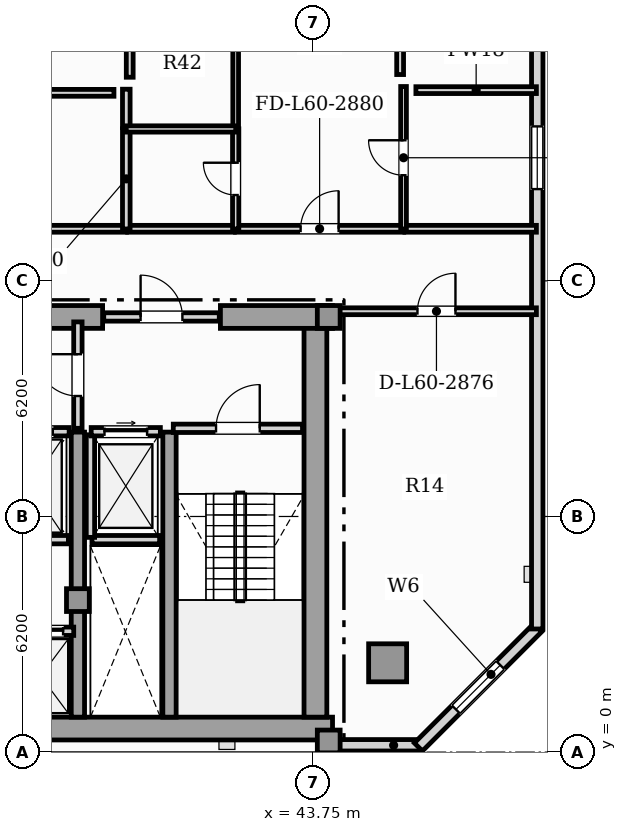
"""IFC4 building model, lengths in metres.
Left out: names, types, materials, properties, quantities, classifications, styles, units other than length and angle.
Written with IfcOpenShell. Run it as: python <this file> out.ifc"""

import sys

from ifc_helpers import new_model, si_unit, direction, frame, frame_2d, origin, origin_2d, place, context, subcontext, project, spatial, rectangle, hollow_rectangle, extrude, element, fill, save


model = new_model("IFC4")
c1 = context("Model", 3, precision=1e-05, world=origin(), true_north=direction((0.0, 1.0)))
c2 = subcontext(c1, "Body", "Model", "MODEL_VIEW")
j1 = project(units=[si_unit("LENGTHUNIT", "METRE"), si_unit("PLANEANGLEUNIT", "RADIAN")], contexts=[c1])
p1 = place(None, origin())
s1 = spatial("IfcSite", under=j1, at=p1, CompositionType="ELEMENT")
p2 = place(p1, origin())
s2 = spatial("IfcBuilding", under=s1, at=p2, CompositionType="ELEMENT")
p3 = place(p2, frame((0.0, 0.0, 242.65)))
s3 = spatial("IfcBuildingStorey", under=s2, at=p3, CompositionType="ELEMENT", Elevation=242.65)
p4 = place(p3, frame((13.25, 0.62, 0.0), z_axis=(0.0, 0.0, 1.0), x_axis=(1.0, 0.0, 0.0)))
e1 = element("IfcWall", 1, at=p4, inside=s3, PredefinedType="SHEAR", context=c2, shape_type="SweptSolid", body=[
    extrude(rectangle(XDim=31.0, YDim=0.6, at=frame_2d((15.5, 0.0))), origin(), (0.0, 0.0, 1.0), 3.5),
])
p5 = place(p3, frame((43.8, 0.92, 0.0), z_axis=(0.0, 0.0, 1.0), x_axis=(0.0, 1.0, 0.0)))
e2 = element("IfcWall", 2, at=p5, inside=s3, PredefinedType="SHEAR", context=c2, shape_type="SweptSolid", body=[
    extrude(rectangle(XDim=10.53, YDim=0.6, at=frame_2d((5.265, 0.0))), origin(), (0.0, 0.0, 1.0), 3.5),
])
p6 = place(p3, frame((30.9, 11.45, 0.0), z_axis=(0.0, 0.0, 1.0), x_axis=(1.0, 0.0, 0.0)))
e3 = element("IfcWall", 3, at=p6, inside=s3, PredefinedType="SHEAR", context=c2, shape_type="SweptSolid", body=[
    extrude(rectangle(XDim=7.3, YDim=0.6, at=frame_2d((3.65, 0.0))), origin(), (0.0, 0.0, 1.0), 3.5),
])
p7 = place(p3, frame((41.3, 11.45, 0.0), z_axis=(0.0, 0.0, 1.0), x_axis=(1.0, 0.0, 0.0)))
e4 = element("IfcWall", 4, at=p7, inside=s3, PredefinedType="SHEAR", context=c2, shape_type="SweptSolid", body=[
    extrude(rectangle(XDim=2.95, YDim=0.6, at=frame_2d((1.475, 0.0))), origin(), (0.0, 0.0, 1.0), 3.5),
])
for number, where, z_axis, x_axis in (
    (5, (37.55, 0.92, 0.0), (0.0, 0.0, 1.0), (0.0, 1.0, 0.0)),
    (6, (39.96, 0.92, 0.0), (0.0, 0.0, 1.0), (0.0, 1.0, 0.0)),
):
    element("IfcWall", number, at=place(p3, frame(where, z_axis=z_axis, x_axis=x_axis)), inside=s3, PredefinedType="SHEAR", context=c2, shape_type="SweptSolid", body=[
        extrude(rectangle(XDim=7.5, YDim=0.35, at=frame_2d((3.75, 0.0))), origin(), (0.0, 0.0, 1.0), 3.5),
    ])
for number, where, z_axis, x_axis in (
    (7, (44.15, 0.28, 0.0), (0.0, 0.0, 1.0), (1.0, 0.0, 0.0)),
    (8, (44.15, 11.45, 0.0), (0.0, 0.0, 1.0), (1.0, 0.0, 0.0)),
    (9, (37.55, 4.0, 0.0), (0.0, 0.0, 1.0), (1.0, 0.0, 0.0)),
):
    element("IfcColumn", number, at=place(p3, frame(where, z_axis=z_axis, x_axis=x_axis)), inside=s3, PredefinedType="COLUMN", context=c2, shape_type="SweptSolid", body=[
        extrude(rectangle(XDim=0.6, YDim=0.6, at=origin_2d()), origin(), (0.0, 0.0, 1.0), 3.85),
    ])
p8 = place(p3, frame((45.7, 2.35, 0.0), z_axis=(0.0, 0.0, 1.0), x_axis=(1.0, 0.0, 0.0)))
e10 = element("IfcColumn", 10, at=p8, inside=s3, PredefinedType="USERDEFINED", context=c2, shape_type="SweptSolid", body=[
    extrude(hollow_rectangle(XDim=1.0, YDim=1.0, WallThickness=0.06, at=origin_2d()), origin(), (0.0, 0.0, 1.0), 3.85),
])
p9 = place(p3, frame((44.25, 0.18, 0.0), z_axis=(0.0, 0.0, 1.0), x_axis=(1.0, 0.0, 0.0)))
e11 = element("IfcWall", 11, at=p9, inside=s3, PredefinedType="SOLIDWALL", context=c2, shape_type="SweptSolid", body=[
    extrude(rectangle(XDim=2.297, YDim=0.3, at=frame_2d((1.148, 0.0))), origin(), (0.0, 0.0, 1.0), 3.5),
])
p10 = place(p3, frame((46.509, 0.135, 0.0), z_axis=(0.0, 0.0, 1.0), x_axis=(0.707134240044, 0.707079321262, 0.0)))
e12 = element("IfcWall", 12, at=p10, inside=s3, PredefinedType="SOLIDWALL", context=c2, shape_type="SweptSolid", body=[
    extrude(rectangle(XDim=4.446, YDim=0.3, at=frame_2d((2.223, 0.0))), origin(), (0.0, 0.0, 1.0), 3.5),
])
p11 = place(p10, frame((1.398, 0.0, 0.88)))
e13 = element("IfcOpeningElement", 13, at=p11, cuts=e12, PredefinedType="OPENING", context=c2, shape_type="SweptSolid", body=[
    extrude(rectangle(XDim=1.65, YDim=2.0, at=frame_2d((0.825, 1.0))), frame((0.0, 0.16, 0.0), z_axis=(0.0, -1.0, 0.0), x_axis=(1.0, 0.0, 0.0)), (0.0, 0.0, 1.0), 0.32),
])
p12 = place(p3, frame((49.637, 3.24, 0.0), z_axis=(0.0, 0.0, 1.0), x_axis=(0.0, 1.0, 0.0)))
e14 = element("IfcWall", 14, at=p12, inside=s3, PredefinedType="SOLIDWALL", context=c2, shape_type="SweptSolid", body=[
    extrude(rectangle(XDim=30.103, YDim=0.3, at=frame_2d((15.052, 0.0))), origin(), (0.0, 0.0, 1.0), 3.5),
])
p13 = place(p12, frame((24.06, 0.0, 0.95)))
e15 = element("IfcOpeningElement", 15, at=p13, cuts=e14, PredefinedType="OPENING", context=c2, shape_type="SweptSolid", body=[
    extrude(rectangle(XDim=0.9, YDim=1.5, at=frame_2d((0.45, 0.75))), frame((0.0, 0.16, 0.0), z_axis=(0.0, -1.0, 0.0), x_axis=(1.0, 0.0, 0.0)), (0.0, 0.0, 1.0), 0.32),
])
p14 = place(p12, frame((11.574, 0.0, 0.88)))
e16 = element("IfcOpeningElement", 16, at=p14, cuts=e14, PredefinedType="OPENING", context=c2, shape_type="SweptSolid", body=[
    extrude(rectangle(XDim=1.65, YDim=2.0, at=frame_2d((0.825, 1.0))), frame((0.0, 0.16, 0.0), z_axis=(0.0, -1.0, 0.0), x_axis=(1.0, 0.0, 0.0)), (0.0, 0.0, 1.0), 0.32),
])
p15 = place(p12, frame((26.182, 0.0, 0.88)))
e17 = element("IfcOpeningElement", 17, at=p15, cuts=e14, PredefinedType="OPENING", context=c2, shape_type="SweptSolid", body=[
    extrude(rectangle(XDim=1.65, YDim=2.0, at=frame_2d((0.825, 1.0))), frame((0.0, 0.16, 0.0), z_axis=(0.0, -1.0, 0.0), x_axis=(1.0, 0.0, 0.0)), (0.0, 0.0, 1.0), 0.32),
])
p16 = place(p3, frame((37.92, 5.59, 0.0), z_axis=(0.0, 0.0, 1.0), x_axis=(1.0, 0.0, 0.0)))
e18 = element("IfcWall", 18, at=p16, inside=s3, PredefinedType="SOLIDWALL", context=c2, shape_type="SweptSolid", body=[
    extrude(rectangle(XDim=1.78, YDim=0.22, at=frame_2d((0.89, 0.0))), origin(), (0.0, 0.0, 1.0), 3.5),
])
p17 = place(p3, frame((37.88, 5.65, 0.0), z_axis=(0.0, 0.0, 1.0), x_axis=(0.0, 1.0, 0.0)))
e19 = element("IfcWall", 19, at=p17, inside=s3, PredefinedType="SOLIDWALL", context=c2, shape_type="SweptSolid", body=[
    extrude(rectangle(XDim=2.7, YDim=0.22, at=frame_2d((1.35, 0.0))), origin(), (0.0, 0.0, 1.0), 3.5),
])
p18 = place(p3, frame((37.9, 8.43, 0.0), z_axis=(0.0, 0.0, 1.0), x_axis=(1.0, 0.0, 0.0)))
e20 = element("IfcWall", 20, at=p18, inside=s3, PredefinedType="SOLIDWALL", context=c2, shape_type="SweptSolid", body=[
    extrude(rectangle(XDim=1.82, YDim=0.22, at=frame_2d((0.91, 0.0))), origin(), (0.0, 0.0, 1.0), 3.5),
])
p19 = place(p18, frame((0.35, 0.0, 0.0)))
e21 = element("IfcOpeningElement", 21, at=p19, cuts=e20, PredefinedType="OPENING", context=c2, shape_type="SweptSolid", body=[
    extrude(rectangle(XDim=1.12, YDim=2.25, at=frame_2d((0.56, 1.125))), frame((0.0, 0.12, 0.0), z_axis=(0.0, -1.0, 0.0), x_axis=(1.0, 0.0, 0.0)), (0.0, 0.0, 1.0), 0.24),
])
p20 = place(p3, frame((35.3, 5.59, 0.0), z_axis=(0.0, 0.0, 1.0), x_axis=(1.0, 0.0, 0.0)))
e22 = element("IfcWall", 22, at=p20, inside=s3, PredefinedType="SOLIDWALL", context=c2, shape_type="SweptSolid", body=[
    extrude(rectangle(XDim=2.0, YDim=0.22, at=frame_2d((1.0, 0.0))), origin(), (0.0, 0.0, 1.0), 3.5),
])
p21 = place(p3, frame((35.28, 8.43, 0.0), z_axis=(0.0, 0.0, 1.0), x_axis=(1.0, 0.0, 0.0)))
e23 = element("IfcWall", 23, at=p21, inside=s3, PredefinedType="SOLIDWALL", context=c2, shape_type="SweptSolid", body=[
    extrude(rectangle(XDim=2.04, YDim=0.22, at=frame_2d((1.02, 0.0))), origin(), (0.0, 0.0, 1.0), 3.5),
])
p22 = place(p21, frame((0.43, 0.0, 0.0)))
e24 = element("IfcOpeningElement", 24, at=p22, cuts=e23, PredefinedType="OPENING", context=c2, shape_type="SweptSolid", body=[
    extrude(rectangle(XDim=1.18, YDim=2.2, at=frame_2d((0.59, 1.1))), frame((0.0, 0.12, 0.0), z_axis=(0.0, -1.0, 0.0), x_axis=(1.0, 0.0, 0.0)), (0.0, 0.0, 1.0), 0.24),
])
p23 = place(p3, frame((35.7, 3.18, 0.0), z_axis=(0.0, 0.0, 1.0), x_axis=(1.0, 0.0, 0.0)))
e25 = element("IfcWall", 25, at=p23, inside=s3, PredefinedType="SOLIDWALL", context=c2, shape_type="SweptSolid", body=[
    extrude(rectangle(XDim=1.74, YDim=0.22, at=frame_2d((0.87, 0.0))), origin(), (0.0, 0.0, 1.0), 3.5),
])
p24 = place(p23, frame((0.28, 0.0, 0.0)))
e26 = element("IfcOpeningElement", 26, at=p24, cuts=e25, PredefinedType="OPENING", context=c2, shape_type="SweptSolid", body=[
    extrude(rectangle(XDim=1.18, YDim=2.2, at=frame_2d((0.59, 1.1))), frame((0.0, 0.12, 0.0), z_axis=(0.0, -1.0, 0.0), x_axis=(1.0, 0.0, 0.0)), (0.0, 0.0, 1.0), 0.24),
])
p25 = place(p3, frame((40.06, 8.52, 0.0), z_axis=(0.0, 0.0, 1.0), x_axis=(1.0, 0.0, 0.0)))
e27 = element("IfcWall", 27, at=p25, inside=s3, PredefinedType="SOLIDWALL", context=c2, shape_type="SweptSolid", body=[
    extrude(rectangle(XDim=3.4, YDim=0.22, at=frame_2d((1.7, 0.0))), origin(), (0.0, 0.0, 1.0), 3.5),
])
p26 = place(p25, frame((1.125, 0.0, 0.0)))
e28 = element("IfcOpeningElement", 28, at=p26, cuts=e27, PredefinedType="OPENING", context=c2, shape_type="SweptSolid", body=[
    extrude(rectangle(XDim=1.15, YDim=2.2, at=frame_2d((0.575, 1.1))), frame((0.0, 0.12, 0.0), z_axis=(0.0, -1.0, 0.0), x_axis=(1.0, 0.0, 0.0)), (0.0, 0.0, 1.0), 0.24),
])
p27 = place(p3, frame((37.55, 8.52, 0.0), z_axis=(0.0, 0.0, 1.0), x_axis=(0.0, 1.0, 0.0)))
e29 = element("IfcWall", 29, at=p27, inside=s3, PredefinedType="SOLIDWALL", context=c2, shape_type="SweptSolid", body=[
    extrude(rectangle(XDim=2.8, YDim=0.22, at=frame_2d((1.4, 0.0))), origin(), (0.0, 0.0, 1.0), 2.956),
])
p28 = place(p27, frame((0.85, 0.0, 0.0)))
e30 = element("IfcOpeningElement", 30, at=p28, cuts=e29, PredefinedType="OPENING", context=c2, shape_type="SweptSolid", body=[
    extrude(rectangle(XDim=1.1, YDim=2.2, at=frame_2d((0.55, 1.1))), frame((0.0, 0.12, 0.0), z_axis=(0.0, -1.0, 0.0), x_axis=(1.0, 0.0, 0.0)), (0.0, 0.0, 1.0), 0.24),
])
p29 = place(p3, frame((38.23, 11.45, 0.0), z_axis=(0.0, 0.0, 1.0), x_axis=(1.0, 0.0, 0.0)))
e31 = element("IfcWall", 31, at=p29, inside=s3, PredefinedType="SOLIDWALL", context=c2, shape_type="SweptSolid", body=[
    extrude(rectangle(XDim=3.04, YDim=0.22, at=frame_2d((1.52, 0.0))), origin(), (0.0, 0.0, 1.0), 3.5),
])
p30 = place(p29, frame((0.97, 0.0, 0.0)))
e32 = element("IfcOpeningElement", 32, at=p30, cuts=e31, PredefinedType="OPENING", context=c2, shape_type="SweptSolid", body=[
    extrude(rectangle(XDim=1.1, YDim=2.2, at=frame_2d((0.55, 1.1))), frame((0.0, 0.12, 0.0), z_axis=(0.0, -1.0, 0.0), x_axis=(1.0, 0.0, 0.0)), (0.0, 0.0, 1.0), 0.24),
])
p31 = place(p3, frame((44.355, 11.6, 0.0), z_axis=(0.0, 0.0, 1.0), x_axis=(1.0, 0.0, 0.0)))
e33 = element("IfcWall", 33, at=p31, inside=s3, PredefinedType="PARTITIONING", context=c2, shape_type="SweptSolid", body=[
    extrude(rectangle(XDim=5.259, YDim=0.18, at=frame_2d((2.63, 0.0))), origin(), (0.0, 0.0, 1.0), 3.5),
])
p32 = place(p31, frame((2.13, 0.0, 0.0)))
e34 = element("IfcOpeningElement", 34, at=p32, cuts=e33, PredefinedType="OPENING", context=c2, shape_type="SweptSolid", body=[
    extrude(rectangle(XDim=1.0, YDim=2.15, at=frame_2d((0.5, 1.075))), frame((0.0, 0.1, 0.0), z_axis=(0.0, -1.0, 0.0), x_axis=(1.0, 0.0, 0.0)), (0.0, 0.0, 1.0), 0.2),
])
p33 = place(p3, frame((35.926, 13.77, 0.0), z_axis=(0.0, 0.0, 1.0), x_axis=(1.0, 0.0, 0.0)))
e35 = element("IfcWall", 35, at=p33, inside=s3, PredefinedType="PARTITIONING", context=c2, shape_type="SweptSolid", body=[
    extrude(rectangle(XDim=2.903, YDim=0.18, at=frame_2d((1.451, 0.0))), origin(), (0.0, 0.0, 1.0), 3.5),
])
p34 = place(p3, frame((41.697, 13.77, 0.0), z_axis=(0.0, 0.0, 1.0), x_axis=(1.0, 0.0, 0.0)))
e36 = element("IfcWall", 36, at=p34, inside=s3, PredefinedType="PARTITIONING", context=c2, shape_type="SweptSolid", body=[
    extrude(rectangle(XDim=4.427, YDim=0.18, at=frame_2d((2.213, 0.0))), origin(), (0.0, 0.0, 1.0), 3.5),
])
p35 = place(p34, frame((1.713, 0.0, 0.0)))
e37 = element("IfcOpeningElement", 37, at=p35, cuts=e36, PredefinedType="OPENING", context=c2, shape_type="SweptSolid", body=[
    extrude(rectangle(XDim=1.0, YDim=2.15, at=frame_2d((0.5, 1.075))), frame((0.0, 0.1, 0.0), z_axis=(0.0, -1.0, 0.0), x_axis=(1.0, 0.0, 0.0)), (0.0, 0.0, 1.0), 0.2),
])
p36 = place(p3, frame((38.859, 13.77, 0.0), z_axis=(0.0, 0.0, 1.0), x_axis=(1.0, 0.0, 0.0)))
e38 = element("IfcWall", 38, at=p36, inside=s3, PredefinedType="PARTITIONING", context=c2, shape_type="SweptSolid", body=[
    extrude(rectangle(XDim=2.808, YDim=0.18, at=frame_2d((1.404, 0.0))), origin(), (0.0, 0.0, 1.0), 3.5),
])
p37 = place(p3, frame((46.154, 13.77, 0.0), z_axis=(0.0, 0.0, 1.0), x_axis=(1.0, 0.0, 0.0)))
e39 = element("IfcWall", 39, at=p37, inside=s3, PredefinedType="PARTITIONING", context=c2, shape_type="SweptSolid", body=[
    extrude(rectangle(XDim=3.461, YDim=0.18, at=frame_2d((1.73, 0.0))), origin(), (0.0, 0.0, 1.0), 3.5),
])
p38 = place(p3, frame((38.823, 13.765, 0.0), z_axis=(0.0, 0.0, 1.0), x_axis=(0.0, 1.0, 0.0)))
e40 = element("IfcWall", 40, at=p38, inside=s3, PredefinedType="PARTITIONING", context=c2, shape_type="SweptSolid", body=[
    extrude(rectangle(XDim=2.636, YDim=0.2, at=frame_2d((1.318, 0.0))), origin(), (0.0, 0.0, 1.0), 3.5),
])
p39 = place(p3, frame((38.823, 16.431, 0.0), z_axis=(0.0, 0.0, 1.0), x_axis=(0.0, 1.0, 0.0)))
e41 = element("IfcWall", 41, at=p39, inside=s3, PredefinedType="PARTITIONING", context=c2, shape_type="SweptSolid", body=[
    extrude(rectangle(XDim=1.011, YDim=0.2, at=frame_2d((0.505, 0.0))), origin(), (0.0, 0.0, 1.0), 3.5),
])
p40 = place(p3, frame((41.702, 13.765, 0.0), z_axis=(0.0, 0.0, 1.0), x_axis=(0.0, 1.0, 0.0)))
e42 = element("IfcWall", 42, at=p40, inside=s3, PredefinedType="PLUMBINGWALL", context=c2, shape_type="SweptSolid", body=[
    extrude(rectangle(XDim=2.636, YDim=0.165, at=frame_2d((1.318, 0.0))), origin(), (0.0, 0.0, 1.0), 3.5),
])
p41 = place(p40, frame((0.893, 0.0, 0.0)))
e43 = element("IfcOpeningElement", 43, at=p41, cuts=e42, PredefinedType="OPENING", context=c2, shape_type="SweptSolid", body=[
    extrude(rectangle(XDim=0.85, YDim=2.1, at=frame_2d((0.425, 1.05))), frame((0.0, 0.093, 0.0), z_axis=(0.0, -1.0, 0.0), x_axis=(1.0, 0.0, 0.0)), (0.0, 0.0, 1.0), 0.185),
])
p42 = place(p3, frame((41.702, 16.431, 0.0), z_axis=(0.0, 0.0, 1.0), x_axis=(0.0, 1.0, 0.0)))
e44 = element("IfcWall", 44, at=p42, inside=s3, PredefinedType="PARTITIONING", context=c2, shape_type="SweptSolid", body=[
    extrude(rectangle(XDim=10.574, YDim=0.15, at=frame_2d((5.287, 0.0))), origin(), (0.0, 0.0, 1.0), 3.5),
])
p43 = place(p42, frame((4.827, 0.0, 0.0)))
e45 = element("IfcOpeningElement", 45, at=p43, cuts=e44, PredefinedType="OPENING", context=c2, shape_type="SweptSolid", body=[
    extrude(rectangle(XDim=0.92, YDim=2.1, at=frame_2d((0.46, 1.05))), frame((0.0, 0.085, 0.0), z_axis=(0.0, -1.0, 0.0), x_axis=(1.0, 0.0, 0.0)), (0.0, 0.0, 1.0), 0.17),
])
p44 = place(p3, frame((46.119, 13.765, 0.0), z_axis=(0.0, 0.0, 1.0), x_axis=(0.0, 1.0, 0.0)))
e46 = element("IfcWall", 46, at=p44, inside=s3, PredefinedType="PARTITIONING", context=c2, shape_type="SweptSolid", body=[
    extrude(rectangle(XDim=3.748, YDim=0.15, at=frame_2d((1.874, 0.0))), origin(), (0.0, 0.0, 1.0), 3.5),
])
p45 = place(p44, frame((1.414, 0.0, 0.0)))
e47 = element("IfcOpeningElement", 47, at=p45, cuts=e46, PredefinedType="OPENING", context=c2, shape_type="SweptSolid", body=[
    extrude(rectangle(XDim=0.92, YDim=2.1, at=frame_2d((0.46, 1.05))), frame((0.0, 0.085, 0.0), z_axis=(0.0, -1.0, 0.0), x_axis=(1.0, 0.0, 0.0)), (0.0, 0.0, 1.0), 0.17),
])
p46 = place(p3, frame((38.819, 16.396, 0.0), z_axis=(0.0, 0.0, 1.0), x_axis=(1.0, 0.0, 0.0)))
e48 = element("IfcWall", 48, at=p46, inside=s3, PredefinedType="PLUMBINGWALL", context=c2, shape_type="SweptSolid", body=[
    extrude(rectangle(XDim=2.888, YDim=0.165, at=frame_2d((1.444, 0.0))), origin(), (0.0, 0.0, 1.0), 3.5),
])
p47 = place(p3, frame((36.216, 17.347, 0.0), z_axis=(0.0, 0.0, 1.0), x_axis=(1.0, 0.0, 0.0)))
e49 = element("IfcWall", 49, at=p47, inside=s3, PredefinedType="PARTITIONING", context=c2, shape_type="SweptSolid", body=[
    extrude(rectangle(XDim=2.283, YDim=0.18, at=frame_2d((1.141, 0.0))), origin(), (0.0, 0.0, 1.0), 3.5),
])
p48 = place(p3, frame((46.029, 27.185, 0.0), z_axis=(0.0, 0.0, 1.0), x_axis=(0.0, -1.0, 0.0)))
e50 = element("IfcWall", 50, at=p48, inside=s3, PredefinedType="PARTITIONING", context=c2, shape_type="SweptSolid", body=[
    extrude(rectangle(XDim=9.357, YDim=0.18, at=frame_2d((4.679, 0.0))), origin(), (0.0, 0.0, 1.0), 3.5),
])
p49 = place(p3, frame((38.914, 17.757, 0.0), z_axis=(0.0, 0.0, 1.0), x_axis=(0.0, 1.0, 0.0)))
e51 = element("IfcWall", 51, at=p49, inside=s3, PredefinedType="PARTITIONING", context=c2, shape_type="SweptSolid", body=[
    extrude(rectangle(XDim=8.918, YDim=0.18, at=frame_2d((4.459, 0.0))), origin(), (0.0, 0.0, 1.0), 3.5),
])
p50 = place(p3, frame((46.444, 17.418, 0.0), z_axis=(0.0, 0.0, 1.0), x_axis=(1.0, 0.0, 0.0)))
e52 = element("IfcWall", 52, at=p50, inside=s3, PredefinedType="PARTITIONING", context=c2, shape_type="SweptSolid", body=[
    extrude(rectangle(XDim=3.171, YDim=0.18, at=frame_2d((1.585, 0.0))), origin(), (0.0, 0.0, 1.0), 3.5),
])
p51 = place(p11, origin())
e53 = element("IfcWindow", 53, at=p51, inside=s3, PartitioningType="SINGLE_PANEL", PredefinedType="WINDOW", context=c2, shape_type="SweptSolid", body=[
    extrude(rectangle(XDim=1.65, YDim=2.0, at=frame_2d((0.825, 1.0))), frame((0.0, 0.03, 0.0), z_axis=(0.0, -1.0, 0.0), x_axis=(1.0, 0.0, 0.0)), (0.0, 0.0, 1.0), 0.06),
])
fill(e13, e53)
p52 = place(p14, origin())
e54 = element("IfcWindow", 54, at=p52, inside=s3, PartitioningType="SINGLE_PANEL", PredefinedType="WINDOW", context=c2, shape_type="SweptSolid", body=[
    extrude(rectangle(XDim=1.65, YDim=2.0, at=frame_2d((0.825, 1.0))), frame((0.0, 0.03, 0.0), z_axis=(0.0, -1.0, 0.0), x_axis=(1.0, 0.0, 0.0)), (0.0, 0.0, 1.0), 0.06),
])
fill(e16, e54)
p53 = place(p19, origin())
e55 = element("IfcDoor", 55, at=p53, inside=s3, OperationType="SLIDING_TO_RIGHT", PredefinedType="DOOR", context=c2, shape_type="SweptSolid", body=[
    extrude(rectangle(XDim=1.12, YDim=2.25, at=frame_2d((0.56, 1.125))), frame((0.0, 0.025, 0.0), z_axis=(0.0, -1.0, 0.0), x_axis=(1.0, 0.0, 0.0)), (0.0, 0.0, 1.0), 0.05),
])
fill(e21, e55)
p54 = place(p22, origin())
e56 = element("IfcDoor", 56, at=p54, inside=s3, OperationType="SLIDING_TO_LEFT", PredefinedType="DOOR", context=c2, shape_type="SweptSolid", body=[
    extrude(rectangle(XDim=1.18, YDim=2.2, at=frame_2d((0.59, 1.1))), frame((0.0, 0.025, 0.0), z_axis=(0.0, -1.0, 0.0), x_axis=(1.0, 0.0, 0.0)), (0.0, 0.0, 1.0), 0.05),
])
fill(e24, e56)
p55 = place(p24, origin())
e57 = element("IfcDoor", 57, at=p55, inside=s3, OperationType="SLIDING_TO_RIGHT", PredefinedType="DOOR", context=c2, shape_type="SweptSolid", body=[
    extrude(rectangle(XDim=1.18, YDim=2.2, at=frame_2d((0.59, 1.1))), frame((0.0, 0.025, 0.0), z_axis=(0.0, -1.0, 0.0), x_axis=(1.0, 0.0, 0.0)), (0.0, 0.0, 1.0), 0.05),
])
fill(e26, e57)
p56 = place(p26, origin())
e58 = element("IfcDoor", 58, at=p56, inside=s3, OperationType="SINGLE_SWING_RIGHT", PredefinedType="DOOR", context=c2, shape_type="SweptSolid", body=[
    extrude(rectangle(XDim=1.15, YDim=2.2, at=frame_2d((0.575, 1.1))), frame((0.0, 0.025, 0.0), z_axis=(0.0, -1.0, 0.0), x_axis=(1.0, 0.0, 0.0)), (0.0, 0.0, 1.0), 0.05),
])
fill(e28, e58)
p57 = place(p28, origin())
e59 = element("IfcDoor", 59, at=p57, inside=s3, OperationType="SINGLE_SWING_RIGHT", PredefinedType="DOOR", context=c2, shape_type="SweptSolid", body=[
    extrude(rectangle(XDim=1.1, YDim=2.2, at=frame_2d((0.55, 1.1))), frame((0.0, 0.025, 0.0), z_axis=(0.0, -1.0, 0.0), x_axis=(1.0, 0.0, 0.0)), (0.0, 0.0, 1.0), 0.05),
])
fill(e30, e59)
p58 = place(p30, origin())
e60 = element("IfcDoor", 60, at=p58, inside=s3, OperationType="SINGLE_SWING_LEFT", PredefinedType="DOOR", context=c2, shape_type="SweptSolid", body=[
    extrude(rectangle(XDim=1.1, YDim=2.2, at=frame_2d((0.55, 1.1))), frame((0.0, 0.025, 0.0), z_axis=(0.0, -1.0, 0.0), x_axis=(1.0, 0.0, 0.0)), (0.0, 0.0, 1.0), 0.05),
])
fill(e32, e60)
p59 = place(p32, origin())
e61 = element("IfcDoor", 61, at=p59, inside=s3, OperationType="SINGLE_SWING_RIGHT", PredefinedType="DOOR", context=c2, shape_type="SweptSolid", body=[
    extrude(rectangle(XDim=1.0, YDim=2.15, at=frame_2d((0.5, 1.075))), frame((0.0, 0.025, 0.0), z_axis=(0.0, -1.0, 0.0), x_axis=(1.0, 0.0, 0.0)), (0.0, 0.0, 1.0), 0.05),
])
fill(e34, e61)
p60 = place(p35, origin())
e62 = element("IfcDoor", 62, at=p60, inside=s3, OperationType="SINGLE_SWING_RIGHT", PredefinedType="DOOR", context=c2, shape_type="SweptSolid", body=[
    extrude(rectangle(XDim=1.0, YDim=2.15, at=frame_2d((0.5, 1.075))), frame((0.0, 0.025, 0.0), z_axis=(0.0, -1.0, 0.0), x_axis=(1.0, 0.0, 0.0)), (0.0, 0.0, 1.0), 0.05),
])
fill(e37, e62)
p61 = place(p41, origin())
e63 = element("IfcDoor", 63, at=p61, inside=s3, OperationType="SINGLE_SWING_RIGHT", PredefinedType="DOOR", context=c2, shape_type="SweptSolid", body=[
    extrude(rectangle(XDim=0.85, YDim=2.1, at=frame_2d((0.425, 1.05))), frame((0.0, 0.025, 0.0), z_axis=(0.0, -1.0, 0.0), x_axis=(1.0, 0.0, 0.0)), (0.0, 0.0, 1.0), 0.05),
])
fill(e43, e63)
p62 = place(p45, origin())
e64 = element("IfcDoor", 64, at=p62, inside=s3, OperationType="SINGLE_SWING_RIGHT", PredefinedType="DOOR", context=c2, shape_type="SweptSolid", body=[
    extrude(rectangle(XDim=0.92, YDim=2.1, at=frame_2d((0.46, 1.05))), frame((0.0, 0.025, 0.0), z_axis=(0.0, -1.0, 0.0), x_axis=(1.0, 0.0, 0.0)), (0.0, 0.0, 1.0), 0.05),
])
fill(e47, e64)
save(model, sys.argv[1])
